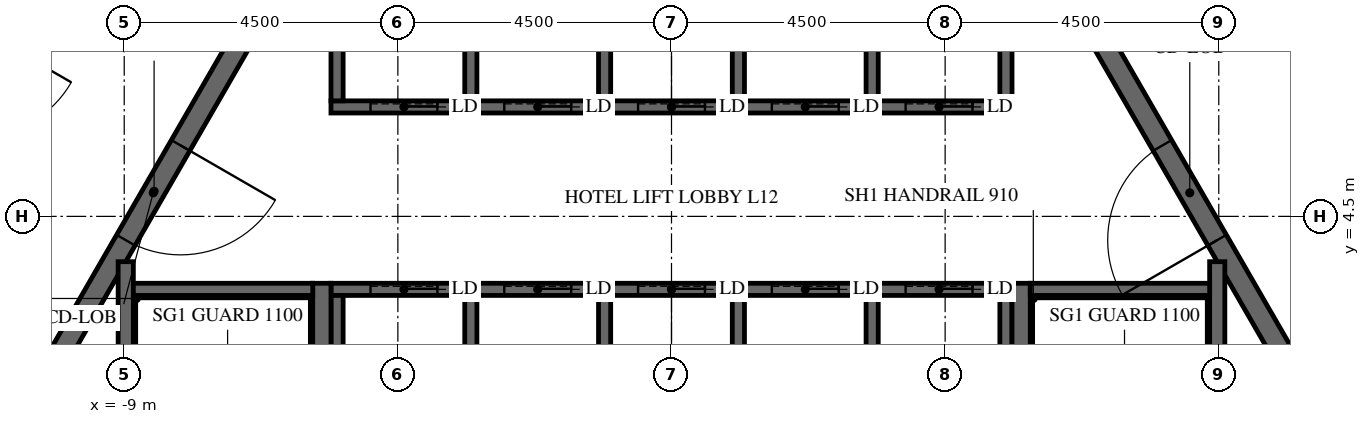
"""IFC4 building model, lengths in metres.
Left out: names, types, materials, properties, quantities, classifications, styles, units other than length and angle.
Written with IfcOpenShell. Run it as: python <this file> out.ifc"""

import sys

from ifc_helpers import new_model, si_unit, direction, frame, frame_2d, origin, place, context, subcontext, project, spatial, polyline, rectangle, outline, extrude, element, fill, save


model = new_model("IFC4")
c1 = context("Model", 3, precision=1e-05, world=origin(), true_north=direction((0.0, 1.0)))
c2 = subcontext(c1, "Body", "Model", "MODEL_VIEW")
j1 = project(units=[si_unit("LENGTHUNIT", "METRE"), si_unit("PLANEANGLEUNIT", "RADIAN")], contexts=[c1])
p1 = place(None, origin())
s1 = spatial("IfcSite", under=j1, at=p1, CompositionType="ELEMENT")
p2 = place(p1, origin())
s2 = spatial("IfcBuilding", under=s1, at=p2, CompositionType="ELEMENT")
p3 = place(p2, frame((0.0, 0.0, 60.9)))
s3 = spatial("IfcBuildingStorey", under=s2, at=p3, CompositionType="ELEMENT", Elevation=60.9)
p4 = place(p3, frame((-7.91, 13.7, -0.15), z_axis=(0.0, 0.0, 1.0), x_axis=(-0.499999880136, -0.866025472988, 0.0)))
e1 = element("IfcWall", 1, at=p4, inside=s3, PredefinedType="SHEAR", context=c2, shape_type="SweptSolid", body=[
    extrude(outline(polyline([(-0.173, -0.3), (15.993, -0.3), (15.646, 0.3), (0.173, 0.3), (-0.173, -0.3)])), origin(), (0.0, 0.0, 1.0), 3.9),
])
p5 = place(p4, frame((7.039, 0.0, 0.15)))
e2 = element("IfcOpeningElement", 2, at=p5, cuts=e1, PredefinedType="OPENING", context=c2, shape_type="SweptSolid", body=[
    extrude(rectangle(XDim=1.8, YDim=2.4, at=frame_2d((0.9, 1.2))), frame((0.0, 0.31, 0.0), z_axis=(0.0, -1.0, 0.0), x_axis=(1.0, 0.0, 0.0)), (0.0, 0.0, 1.0), 0.62),
])
p6 = place(p3, frame((15.819, 0.0, -0.15), z_axis=(0.0, 0.0, 1.0), x_axis=(-0.499999880136, 0.866025472988, 0.0)))
e3 = element("IfcWall", 3, at=p6, inside=s3, PredefinedType="SHEAR", context=c2, shape_type="SweptSolid", body=[
    extrude(outline(polyline([(-0.173, -0.3), (15.993, -0.3), (15.646, 0.3), (0.173, 0.3), (-0.173, -0.3)])), origin(), (0.0, 0.0, 1.0), 3.9),
])
p7 = place(p6, frame((6.981, 0.0, 0.15)))
e4 = element("IfcOpeningElement", 4, at=p7, cuts=e3, PredefinedType="OPENING", context=c2, shape_type="SweptSolid", body=[
    extrude(rectangle(XDim=1.8, YDim=2.4, at=frame_2d((0.9, 1.2))), frame((0.0, 0.31, 0.0), z_axis=(0.0, -1.0, 0.0), x_axis=(1.0, 0.0, 0.0)), (0.0, 0.0, 1.0), 0.62),
])
p8 = place(p3, frame((-5.673, 9.825, -0.15), z_axis=(0.0, 0.0, 1.0), x_axis=(-0.499995046907, -0.866028263435, 0.0)))
e5 = element("IfcWall", 5, at=p8, inside=s3, PredefinedType="SHEAR", context=c2, shape_type="SweptSolid", body=[
    extrude(outline(polyline([(-0.101, -0.175), (11.446, -0.175), (11.244, 0.175), (0.101, 0.175), (-0.101, -0.175)])), origin(), (0.0, 0.0, 1.0), 3.9),
])
p9 = place(p8, frame((4.801, 0.0, 0.15)))
e6 = element("IfcOpeningElement", 6, at=p9, cuts=e5, PredefinedType="OPENING", context=c2, shape_type="SweptSolid", body=[
    extrude(rectangle(XDim=1.8, YDim=2.4, at=frame_2d((0.9, 1.2))), frame((0.0, 0.185, 0.0), z_axis=(0.0, -1.0, 0.0), x_axis=(1.0, 0.0, 0.0)), (0.0, 0.0, 1.0), 0.37),
])
p10 = place(p3, frame((11.345, 0.0, -0.15), z_axis=(0.0, 0.0, 1.0), x_axis=(-0.499995046907, 0.866028263435, 0.0)))
e7 = element("IfcWall", 7, at=p10, inside=s3, PredefinedType="SHEAR", context=c2, shape_type="SweptSolid", body=[
    extrude(outline(polyline([(-0.101, -0.175), (11.446, -0.175), (11.244, 0.175), (0.101, 0.175), (-0.101, -0.175)])), origin(), (0.0, 0.0, 1.0), 3.9),
])
p11 = place(p10, frame((4.744, 0.0, 0.15)))
e8 = element("IfcOpeningElement", 8, at=p11, cuts=e7, PredefinedType="OPENING", context=c2, shape_type="SweptSolid", body=[
    extrude(rectangle(XDim=1.8, YDim=2.4, at=frame_2d((0.9, 1.2))), frame((0.0, 0.185, 0.0), z_axis=(0.0, -1.0, 0.0), x_axis=(1.0, 0.0, 0.0)), (0.0, 0.0, 1.0), 0.37),
])
p12 = place(p3, frame((-5.6, 6.3, -0.25), z_axis=(0.0, 0.0, 1.0), x_axis=(1.0, 0.0, 0.0)))
e9 = element("IfcWall", 9, at=p12, inside=s3, PredefinedType="SHEAR", context=c2, shape_type="SweptSolid", body=[
    extrude(rectangle(XDim=11.2, YDim=0.2, at=frame_2d((5.6, 0.0))), origin(), (0.0, 0.0, 1.0), 3.9),
])
p13 = place(p12, frame((0.65, 0.0, 0.25)))
e10 = element("IfcOpeningElement", 10, at=p13, cuts=e9, PredefinedType="OPENING", context=c2, shape_type="SweptSolid", body=[
    extrude(rectangle(XDim=1.1, YDim=2.1, at=frame_2d((0.55, 1.05))), frame((0.0, 0.11, 0.0), z_axis=(0.0, -1.0, 0.0), x_axis=(1.0, 0.0, 0.0)), (0.0, 0.0, 1.0), 0.22),
])
p14 = place(p12, frame((2.85, 0.0, 0.25)))
e11 = element("IfcOpeningElement", 11, at=p14, cuts=e9, PredefinedType="OPENING", context=c2, shape_type="SweptSolid", body=[
    extrude(rectangle(XDim=1.1, YDim=2.1, at=frame_2d((0.55, 1.05))), frame((0.0, 0.11, 0.0), z_axis=(0.0, -1.0, 0.0), x_axis=(1.0, 0.0, 0.0)), (0.0, 0.0, 1.0), 0.22),
])
p15 = place(p12, frame((5.05, 0.0, 0.25)))
e12 = element("IfcOpeningElement", 12, at=p15, cuts=e9, PredefinedType="OPENING", context=c2, shape_type="SweptSolid", body=[
    extrude(rectangle(XDim=1.1, YDim=2.1, at=frame_2d((0.55, 1.05))), frame((0.0, 0.11, 0.0), z_axis=(0.0, -1.0, 0.0), x_axis=(1.0, 0.0, 0.0)), (0.0, 0.0, 1.0), 0.22),
])
p16 = place(p12, frame((7.25, 0.0, 0.25)))
e13 = element("IfcOpeningElement", 13, at=p16, cuts=e9, PredefinedType="OPENING", context=c2, shape_type="SweptSolid", body=[
    extrude(rectangle(XDim=1.1, YDim=2.1, at=frame_2d((0.55, 1.05))), frame((0.0, 0.11, 0.0), z_axis=(0.0, -1.0, 0.0), x_axis=(1.0, 0.0, 0.0)), (0.0, 0.0, 1.0), 0.22),
])
p17 = place(p12, frame((9.45, 0.0, 0.25)))
e14 = element("IfcOpeningElement", 14, at=p17, cuts=e9, PredefinedType="OPENING", context=c2, shape_type="SweptSolid", body=[
    extrude(rectangle(XDim=1.1, YDim=2.1, at=frame_2d((0.55, 1.05))), frame((0.0, 0.11, 0.0), z_axis=(0.0, -1.0, 0.0), x_axis=(1.0, 0.0, 0.0)), (0.0, 0.0, 1.0), 0.22),
])
for number, where, z_axis, x_axis in (
    (15, (-5.5, 6.4, -0.25), (0.0, 0.0, 1.0), (0.0, 1.0, 0.0)),
    (16, (-3.3, 6.4, -0.25), (0.0, 0.0, 1.0), (0.0, 1.0, 0.0)),
    (17, (-1.1, 6.4, -0.25), (0.0, 0.0, 1.0), (0.0, 1.0, 0.0)),
    (18, (1.1, 6.4, -0.25), (0.0, 0.0, 1.0), (0.0, 1.0, 0.0)),
    (19, (3.3, 6.4, -0.25), (0.0, 0.0, 1.0), (0.0, 1.0, 0.0)),
    (20, (5.5, 6.4, -0.25), (0.0, 0.0, 1.0), (0.0, 1.0, 0.0)),
):
    element("IfcWall", number, at=place(p3, frame(where, z_axis=z_axis, x_axis=x_axis)), inside=s3, PredefinedType="SHEAR", context=c2, shape_type="SweptSolid", body=[
        extrude(rectangle(XDim=2.9, YDim=0.2, at=frame_2d((1.45, 0.0))), origin(), (0.0, 0.0, 1.0), 3.9),
    ])
p18 = place(p3, frame((-5.6, 3.3, -0.25), z_axis=(0.0, 0.0, 1.0), x_axis=(1.0, 0.0, 0.0)))
e21 = element("IfcWall", 21, at=p18, inside=s3, PredefinedType="SHEAR", context=c2, shape_type="SweptSolid", body=[
    extrude(rectangle(XDim=11.2, YDim=0.2, at=frame_2d((5.6, 0.0))), origin(), (0.0, 0.0, 1.0), 3.9),
])
p19 = place(p18, frame((0.65, 0.0, 0.25)))
e22 = element("IfcOpeningElement", 22, at=p19, cuts=e21, PredefinedType="OPENING", context=c2, shape_type="SweptSolid", body=[
    extrude(rectangle(XDim=1.1, YDim=2.1, at=frame_2d((0.55, 1.05))), frame((0.0, 0.11, 0.0), z_axis=(0.0, -1.0, 0.0), x_axis=(1.0, 0.0, 0.0)), (0.0, 0.0, 1.0), 0.22),
])
p20 = place(p18, frame((2.85, 0.0, 0.25)))
e23 = element("IfcOpeningElement", 23, at=p20, cuts=e21, PredefinedType="OPENING", context=c2, shape_type="SweptSolid", body=[
    extrude(rectangle(XDim=1.1, YDim=2.1, at=frame_2d((0.55, 1.05))), frame((0.0, 0.11, 0.0), z_axis=(0.0, -1.0, 0.0), x_axis=(1.0, 0.0, 0.0)), (0.0, 0.0, 1.0), 0.22),
])
p21 = place(p18, frame((5.05, 0.0, 0.25)))
e24 = element("IfcOpeningElement", 24, at=p21, cuts=e21, PredefinedType="OPENING", context=c2, shape_type="SweptSolid", body=[
    extrude(rectangle(XDim=1.1, YDim=2.1, at=frame_2d((0.55, 1.05))), frame((0.0, 0.11, 0.0), z_axis=(0.0, -1.0, 0.0), x_axis=(1.0, 0.0, 0.0)), (0.0, 0.0, 1.0), 0.22),
])
p22 = place(p18, frame((7.25, 0.0, 0.25)))
e25 = element("IfcOpeningElement", 25, at=p22, cuts=e21, PredefinedType="OPENING", context=c2, shape_type="SweptSolid", body=[
    extrude(rectangle(XDim=1.1, YDim=2.1, at=frame_2d((0.55, 1.05))), frame((0.0, 0.11, 0.0), z_axis=(0.0, -1.0, 0.0), x_axis=(1.0, 0.0, 0.0)), (0.0, 0.0, 1.0), 0.22),
])
p23 = place(p18, frame((9.45, 0.0, 0.25)))
e26 = element("IfcOpeningElement", 26, at=p23, cuts=e21, PredefinedType="OPENING", context=c2, shape_type="SweptSolid", body=[
    extrude(rectangle(XDim=1.1, YDim=2.1, at=frame_2d((0.55, 1.05))), frame((0.0, 0.11, 0.0), z_axis=(0.0, -1.0, 0.0), x_axis=(1.0, 0.0, 0.0)), (0.0, 0.0, 1.0), 0.22),
])
for number, where, z_axis, x_axis in (
    (27, (-5.5, 0.1, -0.25), (0.0, 0.0, 1.0), (0.0, 1.0, 0.0)),
    (28, (-3.3, 0.1, -0.25), (0.0, 0.0, 1.0), (0.0, 1.0, 0.0)),
    (29, (-1.1, 0.1, -0.25), (0.0, 0.0, 1.0), (0.0, 1.0, 0.0)),
    (30, (1.1, 0.1, -0.25), (0.0, 0.0, 1.0), (0.0, 1.0, 0.0)),
    (31, (3.3, 0.1, -0.25), (0.0, 0.0, 1.0), (0.0, 1.0, 0.0)),
    (32, (5.5, 0.1, -0.25), (0.0, 0.0, 1.0), (0.0, 1.0, 0.0)),
):
    element("IfcWall", number, at=place(p3, frame(where, z_axis=z_axis, x_axis=x_axis)), inside=s3, PredefinedType="SHEAR", context=c2, shape_type="SweptSolid", body=[
        extrude(rectangle(XDim=3.1, YDim=0.2, at=frame_2d((1.55, 0.0))), origin(), (0.0, 0.0, 1.0), 3.9),
    ])
p24 = place(p3, frame((5.75, -3.4, -0.25), z_axis=(0.0, 0.0, 1.0), x_axis=(0.0, 1.0, 0.0)))
e33 = element("IfcWall", 33, at=p24, inside=s3, PredefinedType="SHEAR", context=c2, shape_type="SweptSolid", body=[
    extrude(rectangle(XDim=6.8, YDim=0.3, at=frame_2d((3.4, 0.0))), origin(), (0.0, 0.0, 1.0), 3.9),
])
p25 = place(p3, frame((8.975, -3.755, -0.25), z_axis=(0.0, 0.0, 1.0), x_axis=(0.0, 1.0, 0.0)))
e34 = element("IfcWall", 34, at=p25, inside=s3, PredefinedType="SHEAR", context=c2, shape_type="SweptSolid", body=[
    extrude(rectangle(XDim=7.51, YDim=0.25, at=frame_2d((3.755, 0.0))), origin(), (0.0, 0.0, 1.0), 3.9),
])
p26 = place(p3, frame((5.9, 3.3, -0.25), z_axis=(0.0, 0.0, 1.0), x_axis=(1.0, 0.0, 0.0)))
e35 = element("IfcWall", 35, at=p26, inside=s3, PredefinedType="SHEAR", context=c2, shape_type="SweptSolid", body=[
    extrude(rectangle(XDim=2.95, YDim=0.2, at=frame_2d((1.475, 0.0))), origin(), (0.0, 0.0, 1.0), 3.9),
])
p27 = place(p3, frame((-5.75, -3.4, -0.25), z_axis=(0.0, 0.0, 1.0), x_axis=(0.0, 1.0, 0.0)))
e36 = element("IfcWall", 36, at=p27, inside=s3, PredefinedType="SHEAR", context=c2, shape_type="SweptSolid", body=[
    extrude(rectangle(XDim=6.8, YDim=0.3, at=frame_2d((3.4, 0.0))), origin(), (0.0, 0.0, 1.0), 3.9),
])
p28 = place(p3, frame((-8.975, -3.755, -0.25), z_axis=(0.0, 0.0, 1.0), x_axis=(0.0, 1.0, 0.0)))
e37 = element("IfcWall", 37, at=p28, inside=s3, PredefinedType="SHEAR", context=c2, shape_type="SweptSolid", body=[
    extrude(rectangle(XDim=7.51, YDim=0.25, at=frame_2d((3.755, 0.0))), origin(), (0.0, 0.0, 1.0), 3.9),
])
p29 = place(p3, frame((-8.85, 3.3, -0.25), z_axis=(0.0, 0.0, 1.0), x_axis=(1.0, 0.0, 0.0)))
e38 = element("IfcWall", 38, at=p29, inside=s3, PredefinedType="SHEAR", context=c2, shape_type="SweptSolid", body=[
    extrude(rectangle(XDim=2.95, YDim=0.2, at=frame_2d((1.475, 0.0))), origin(), (0.0, 0.0, 1.0), 3.9),
])
p30 = place(p9, origin())
e39 = element("IfcDoor", 39, at=p30, inside=s3, OperationType="DOUBLE_DOOR_SINGLE_SWING", PredefinedType="DOOR", context=c2, shape_type="SweptSolid", body=[
    extrude(rectangle(XDim=1.8, YDim=2.4, at=frame_2d((0.9, 1.2))), frame((0.0, 0.025, 0.0), z_axis=(0.0, -1.0, 0.0), x_axis=(1.0, 0.0, 0.0)), (0.0, 0.0, 1.0), 0.05),
])
fill(e6, e39)
p31 = place(p11, origin())
e40 = element("IfcDoor", 40, at=p31, inside=s3, OperationType="DOUBLE_DOOR_SINGLE_SWING", PredefinedType="DOOR", context=c2, shape_type="SweptSolid", body=[
    extrude(rectangle(XDim=1.8, YDim=2.4, at=frame_2d((0.9, 1.2))), frame((0.0, 0.025, 0.0), z_axis=(0.0, -1.0, 0.0), x_axis=(1.0, 0.0, 0.0)), (0.0, 0.0, 1.0), 0.05),
])
fill(e8, e40)
p32 = place(p13, origin())
e41 = element("IfcDoor", 41, at=p32, inside=s3, OperationType="SLIDING_TO_LEFT", PredefinedType="DOOR", context=c2, shape_type="SweptSolid", body=[
    extrude(rectangle(XDim=1.1, YDim=2.1, at=frame_2d((0.55, 1.05))), frame((0.0, 0.025, 0.0), z_axis=(0.0, -1.0, 0.0), x_axis=(1.0, 0.0, 0.0)), (0.0, 0.0, 1.0), 0.05),
])
fill(e10, e41)
p33 = place(p14, origin())
e42 = element("IfcDoor", 42, at=p33, inside=s3, OperationType="SLIDING_TO_LEFT", PredefinedType="DOOR", context=c2, shape_type="SweptSolid", body=[
    extrude(rectangle(XDim=1.1, YDim=2.1, at=frame_2d((0.55, 1.05))), frame((0.0, 0.025, 0.0), z_axis=(0.0, -1.0, 0.0), x_axis=(1.0, 0.0, 0.0)), (0.0, 0.0, 1.0), 0.05),
])
fill(e11, e42)
p34 = place(p15, origin())
e43 = element("IfcDoor", 43, at=p34, inside=s3, OperationType="SLIDING_TO_LEFT", PredefinedType="DOOR", context=c2, shape_type="SweptSolid", body=[
    extrude(rectangle(XDim=1.1, YDim=2.1, at=frame_2d((0.55, 1.05))), frame((0.0, 0.025, 0.0), z_axis=(0.0, -1.0, 0.0), x_axis=(1.0, 0.0, 0.0)), (0.0, 0.0, 1.0), 0.05),
])
fill(e12, e43)
p35 = place(p16, origin())
e44 = element("IfcDoor", 44, at=p35, inside=s3, OperationType="SLIDING_TO_LEFT", PredefinedType="DOOR", context=c2, shape_type="SweptSolid", body=[
    extrude(rectangle(XDim=1.1, YDim=2.1, at=frame_2d((0.55, 1.05))), frame((0.0, 0.025, 0.0), z_axis=(0.0, -1.0, 0.0), x_axis=(1.0, 0.0, 0.0)), (0.0, 0.0, 1.0), 0.05),
])
fill(e13, e44)
p36 = place(p17, origin())
e45 = element("IfcDoor", 45, at=p36, inside=s3, OperationType="SLIDING_TO_LEFT", PredefinedType="DOOR", context=c2, shape_type="SweptSolid", body=[
    extrude(rectangle(XDim=1.1, YDim=2.1, at=frame_2d((0.55, 1.05))), frame((0.0, 0.025, 0.0), z_axis=(0.0, -1.0, 0.0), x_axis=(1.0, 0.0, 0.0)), (0.0, 0.0, 1.0), 0.05),
])
fill(e14, e45)
p37 = place(p19, origin())
e46 = element("IfcDoor", 46, at=p37, inside=s3, OperationType="SLIDING_TO_LEFT", PredefinedType="DOOR", context=c2, shape_type="SweptSolid", body=[
    extrude(rectangle(XDim=1.1, YDim=2.1, at=frame_2d((0.55, 1.05))), frame((0.0, 0.025, 0.0), z_axis=(0.0, -1.0, 0.0), x_axis=(1.0, 0.0, 0.0)), (0.0, 0.0, 1.0), 0.05),
])
fill(e22, e46)
p38 = place(p20, origin())
e47 = element("IfcDoor", 47, at=p38, inside=s3, OperationType="SLIDING_TO_LEFT", PredefinedType="DOOR", context=c2, shape_type="SweptSolid", body=[
    extrude(rectangle(XDim=1.1, YDim=2.1, at=frame_2d((0.55, 1.05))), frame((0.0, 0.025, 0.0), z_axis=(0.0, -1.0, 0.0), x_axis=(1.0, 0.0, 0.0)), (0.0, 0.0, 1.0), 0.05),
])
fill(e23, e47)
p39 = place(p21, origin())
e48 = element("IfcDoor", 48, at=p39, inside=s3, OperationType="SLIDING_TO_LEFT", PredefinedType="DOOR", context=c2, shape_type="SweptSolid", body=[
    extrude(rectangle(XDim=1.1, YDim=2.1, at=frame_2d((0.55, 1.05))), frame((0.0, 0.025, 0.0), z_axis=(0.0, -1.0, 0.0), x_axis=(1.0, 0.0, 0.0)), (0.0, 0.0, 1.0), 0.05),
])
fill(e24, e48)
p40 = place(p22, origin())
e49 = element("IfcDoor", 49, at=p40, inside=s3, OperationType="SLIDING_TO_LEFT", PredefinedType="DOOR", context=c2, shape_type="SweptSolid", body=[
    extrude(rectangle(XDim=1.1, YDim=2.1, at=frame_2d((0.55, 1.05))), frame((0.0, 0.025, 0.0), z_axis=(0.0, -1.0, 0.0), x_axis=(1.0, 0.0, 0.0)), (0.0, 0.0, 1.0), 0.05),
])
fill(e25, e49)
p41 = place(p23, origin())
e50 = element("IfcDoor", 50, at=p41, inside=s3, OperationType="SLIDING_TO_LEFT", PredefinedType="DOOR", context=c2, shape_type="SweptSolid", body=[
    extrude(rectangle(XDim=1.1, YDim=2.1, at=frame_2d((0.55, 1.05))), frame((0.0, 0.025, 0.0), z_axis=(0.0, -1.0, 0.0), x_axis=(1.0, 0.0, 0.0)), (0.0, 0.0, 1.0), 0.05),
])
fill(e26, e50)
save(model, sys.argv[1])
